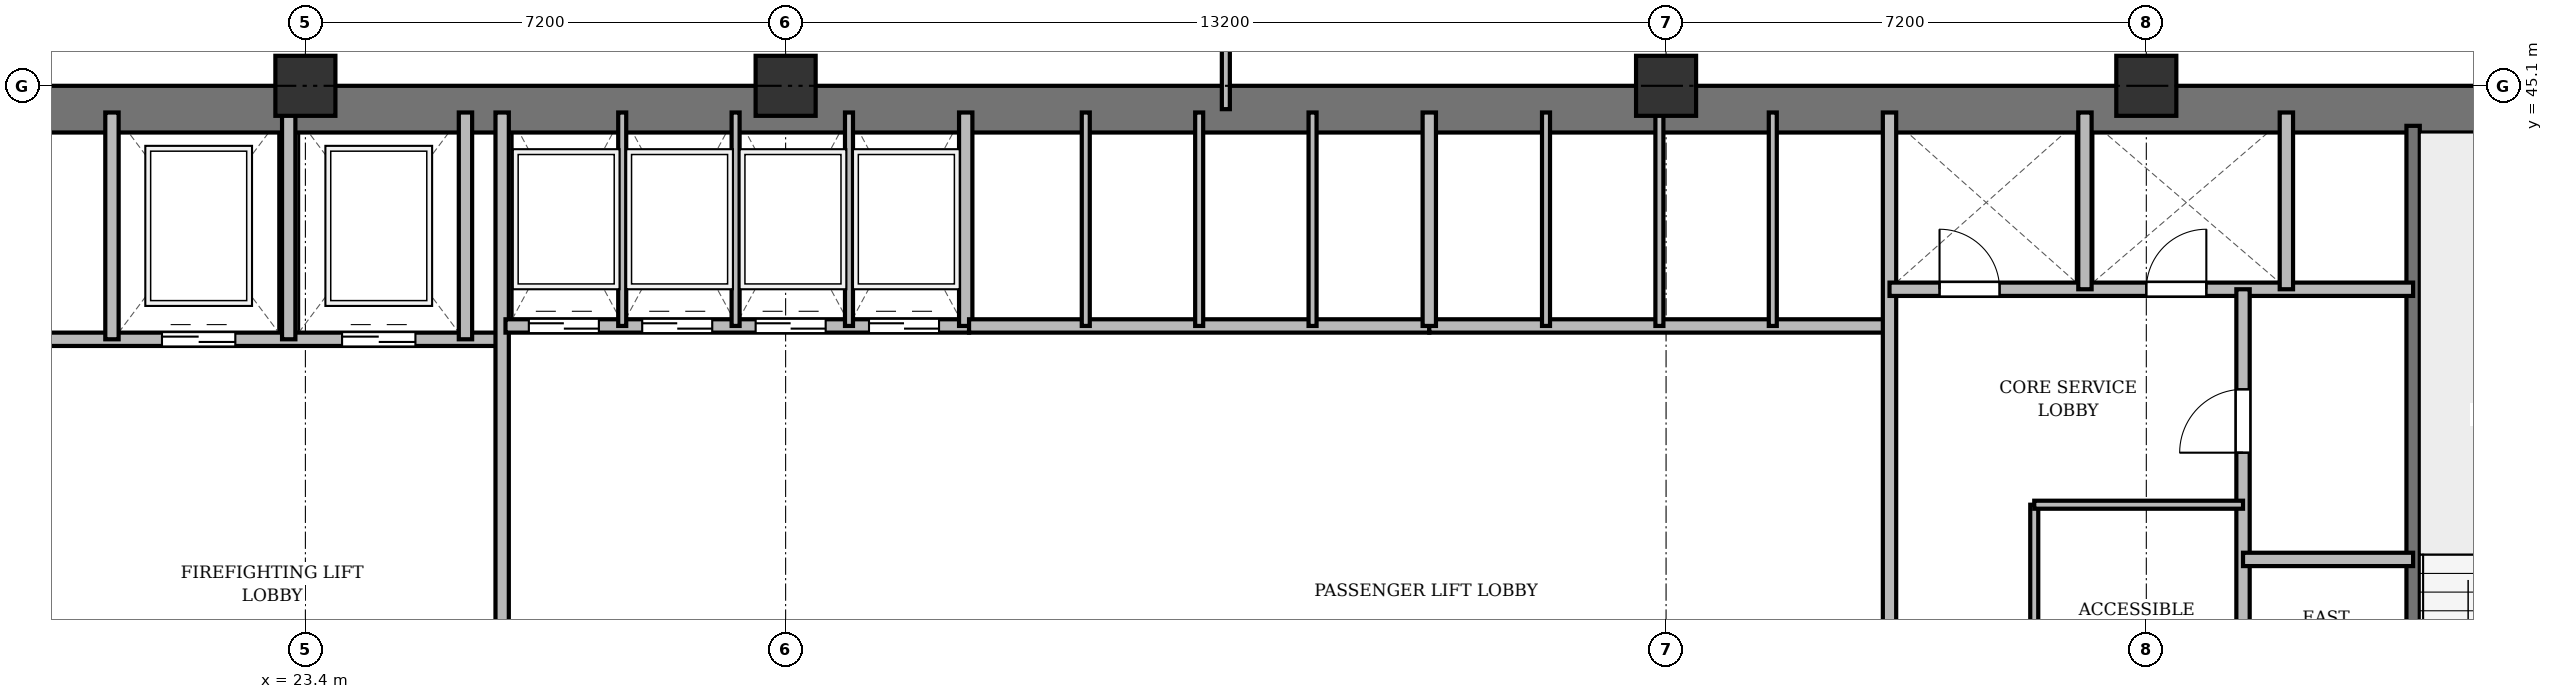
"""IFC4 building model, lengths in metres.
Left out: names, types, materials, properties, quantities, classifications, styles, units other than length and angle.
Written with IfcOpenShell. Run it as: python <this file> out.ifc"""

import sys

from ifc_helpers import new_model, si_unit, direction, frame, frame_2d, origin, origin_2d, place, context, subcontext, project, spatial, rectangle, extrude, source, transform, mapped, element, fill, save


model = new_model("IFC4")
c1 = context("Model", 3, precision=1e-05, world=origin(), true_north=direction((0.0, 1.0)))
c2 = subcontext(c1, "Body", "Model", "MODEL_VIEW")
j1 = project(units=[si_unit("LENGTHUNIT", "METRE"), si_unit("PLANEANGLEUNIT", "RADIAN")], contexts=[c1])
p1 = place(None, origin())
s1 = spatial("IfcSite", under=j1, at=p1, CompositionType="ELEMENT")
p2 = place(p1, origin())
s2 = spatial("IfcBuilding", under=s1, at=p2, CompositionType="ELEMENT")
p3 = place(p2, frame((0.0, 0.0, 27.1)))
s3 = spatial("IfcBuildingStorey", under=s2, at=p3, CompositionType="ELEMENT", Elevation=27.1)
m1 = source(origin(), c2, "Body", "SweptSolid", [
    extrude(rectangle(XDim=0.9, YDim=0.9, at=origin_2d()), origin(), (0.0, 0.0, 1.0), 3.6),
])
for number, where, z_axis, x_axis in (
    (1, (23.4, 45.1, 0.0), (0.0, 0.0, 1.0), (1.0, 0.0, 0.0)),
    (2, (30.6, 45.1, 0.0), (0.0, 0.0, 1.0), (1.0, 0.0, 0.0)),
    (3, (43.8, 45.1, 0.0), (0.0, 0.0, 1.0), (1.0, 0.0, 0.0)),
    (4, (51.0, 45.1, 0.0), (0.0, 0.0, 1.0), (1.0, 0.0, 0.0)),
):
    element("IfcColumn", number, at=place(p3, frame(where, z_axis=z_axis, x_axis=x_axis)), inside=s3, PredefinedType="COLUMN", context=c2, shape_type="MappedRepresentation", body=[
        mapped(m1, transform((0.0, 0.0, 0.0), x_axis=(1.0, 0.0, 0.0), y_axis=(0.0, 1.0, 0.0), z_axis=(0.0, 0.0, 1.0), scale=1.0)),
    ])
p4 = place(p3, frame((15.5, 44.75, 0.0), z_axis=(0.0, 0.0, 1.0), x_axis=(1.0, 0.0, 0.0)))
e5 = element("IfcWall", 5, at=p4, inside=s3, PredefinedType="SHEAR", context=c2, shape_type="SweptSolid", body=[
    extrude(rectangle(XDim=43.4, YDim=0.7, at=frame_2d((21.7, 0.0))), origin(), (0.0, 0.0, 1.0), 3.34),
])
p5 = place(p3, frame((55.0, 33.4, 0.0), z_axis=(0.0, 0.0, 1.0), x_axis=(0.0, 1.0, 0.0)))
e6 = element("IfcWall", 6, at=p5, inside=s3, PredefinedType="SHEAR", context=c2, shape_type="SweptSolid", body=[
    extrude(rectangle(XDim=11.1, YDim=0.2, at=frame_2d((5.55, 0.0))), origin(), (0.0, 0.0, 1.0), 3.34),
])
p6 = place(p5, frame((0.85, 0.0, 0.0)))
e7 = element("IfcOpeningElement", 7, at=p6, cuts=e6, PredefinedType="OPENING", context=c2, shape_type="SweptSolid", body=[
    extrude(rectangle(XDim=1.1, YDim=2.15, at=frame_2d((0.55, 1.075))), frame((0.0, 0.11, 0.0), z_axis=(0.0, -1.0, 0.0), x_axis=(1.0, 0.0, 0.0)), (0.0, 0.0, 1.0), 0.22),
])
p7 = place(p3, frame((19.55, 41.3, 0.0), z_axis=(0.0, 0.0, 1.0), x_axis=(1.0, 0.0, 0.0)))
e8 = element("IfcWall", 8, at=p7, inside=s3, PredefinedType="SOLIDWALL", context=c2, shape_type="SweptSolid", body=[
    extrude(rectangle(XDim=6.75, YDim=0.2, at=frame_2d((3.375, 0.0))), origin(), (0.0, 0.0, 1.0), 3.34),
])
p8 = place(p7, frame((1.7, 0.0, 0.0)))
e9 = element("IfcOpeningElement", 9, at=p8, cuts=e8, PredefinedType="OPENING", context=c2, shape_type="SweptSolid", body=[
    extrude(rectangle(XDim=1.1, YDim=2.15, at=frame_2d((0.55, 1.075))), frame((0.0, 0.11, 0.0), z_axis=(0.0, -1.0, 0.0), x_axis=(1.0, 0.0, 0.0)), (0.0, 0.0, 1.0), 0.22),
])
p9 = place(p7, frame((4.4, 0.0, 0.0)))
e10 = element("IfcOpeningElement", 10, at=p9, cuts=e8, PredefinedType="OPENING", context=c2, shape_type="SweptSolid", body=[
    extrude(rectangle(XDim=1.1, YDim=2.15, at=frame_2d((0.55, 1.075))), frame((0.0, 0.11, 0.0), z_axis=(0.0, -1.0, 0.0), x_axis=(1.0, 0.0, 0.0)), (0.0, 0.0, 1.0), 0.22),
])
for number, where, z_axis, x_axis in (
    (11, (20.5, 41.3, 0.0), (0.0, 0.0, 1.0), (0.0, 1.0, 0.0)),
    (12, (23.15, 41.3, 0.0), (0.0, 0.0, 1.0), (0.0, 1.0, 0.0)),
    (13, (25.8, 41.3, 0.0), (0.0, 0.0, 1.0), (0.0, 1.0, 0.0)),
):
    element("IfcWall", number, at=place(p3, frame(where, z_axis=z_axis, x_axis=x_axis)), inside=s3, PredefinedType="SOLIDWALL", context=c2, shape_type="SweptSolid", body=[
        extrude(rectangle(XDim=3.4, YDim=0.2, at=frame_2d((1.7, 0.0))), origin(), (0.0, 0.0, 1.0), 3.34),
    ])
p10 = place(p3, frame((26.35, 33.4, 0.0), z_axis=(0.0, 0.0, 1.0), x_axis=(0.0, 1.0, 0.0)))
e14 = element("IfcWall", 14, at=p10, inside=s3, PredefinedType="SOLIDWALL", context=c2, shape_type="SweptSolid", body=[
    extrude(rectangle(XDim=11.3, YDim=0.2, at=frame_2d((5.65, 0.0))), origin(), (0.0, 0.0, 1.0), 2.69),
])
p11 = place(p3, frame((26.4, 41.5, 0.0), z_axis=(0.0, 0.0, 1.0), x_axis=(1.0, 0.0, 0.0)))
e15 = element("IfcWall", 15, at=p11, inside=s3, PredefinedType="SOLIDWALL", context=c2, shape_type="SweptSolid", body=[
    extrude(rectangle(XDim=6.95, YDim=0.2, at=frame_2d((3.475, 0.0))), origin(), (0.0, 0.0, 1.0), 3.34),
])
p12 = place(p11, frame((0.35, 0.0, 0.0)))
e16 = element("IfcOpeningElement", 16, at=p12, cuts=e15, PredefinedType="OPENING", context=c2, shape_type="SweptSolid", body=[
    extrude(rectangle(XDim=1.05, YDim=2.15, at=frame_2d((0.525, 1.075))), frame((0.0, 0.11, 0.0), z_axis=(0.0, -1.0, 0.0), x_axis=(1.0, 0.0, 0.0)), (0.0, 0.0, 1.0), 0.22),
])
p13 = place(p11, frame((2.05, 0.0, 0.0)))
e17 = element("IfcOpeningElement", 17, at=p13, cuts=e15, PredefinedType="OPENING", context=c2, shape_type="SweptSolid", body=[
    extrude(rectangle(XDim=1.05, YDim=2.15, at=frame_2d((0.525, 1.075))), frame((0.0, 0.11, 0.0), z_axis=(0.0, -1.0, 0.0), x_axis=(1.0, 0.0, 0.0)), (0.0, 0.0, 1.0), 0.22),
])
p14 = place(p11, frame((3.75, 0.0, 0.0)))
e18 = element("IfcOpeningElement", 18, at=p14, cuts=e15, PredefinedType="OPENING", context=c2, shape_type="SweptSolid", body=[
    extrude(rectangle(XDim=1.05, YDim=2.15, at=frame_2d((0.525, 1.075))), frame((0.0, 0.11, 0.0), z_axis=(0.0, -1.0, 0.0), x_axis=(1.0, 0.0, 0.0)), (0.0, 0.0, 1.0), 0.22),
])
p15 = place(p11, frame((5.45, 0.0, 0.0)))
e19 = element("IfcOpeningElement", 19, at=p15, cuts=e15, PredefinedType="OPENING", context=c2, shape_type="SweptSolid", body=[
    extrude(rectangle(XDim=1.05, YDim=2.15, at=frame_2d((0.525, 1.075))), frame((0.0, 0.11, 0.0), z_axis=(0.0, -1.0, 0.0), x_axis=(1.0, 0.0, 0.0)), (0.0, 0.0, 1.0), 0.22),
])
p16 = place(p3, frame((33.3, 41.5, 0.0), z_axis=(0.0, 0.0, 1.0), x_axis=(0.0, 1.0, 0.0)))
e20 = element("IfcWall", 20, at=p16, inside=s3, PredefinedType="SOLIDWALL", context=c2, shape_type="SweptSolid", body=[
    extrude(rectangle(XDim=3.2, YDim=0.2, at=frame_2d((1.6, 0.0))), origin(), (0.0, 0.0, 1.0), 3.34),
])
for number, where, z_axis, x_axis in (
    (21, (28.15, 41.5, 0.0), (0.0, 0.0, 1.0), (0.0, 1.0, 0.0)),
    (22, (29.85, 41.5, 0.0), (0.0, 0.0, 1.0), (0.0, 1.0, 0.0)),
    (23, (31.55, 41.5, 0.0), (0.0, 0.0, 1.0), (0.0, 1.0, 0.0)),
):
    element("IfcWall", number, at=place(p3, frame(where, z_axis=z_axis, x_axis=x_axis)), inside=s3, PredefinedType="PARTITIONING", context=c2, shape_type="SweptSolid", body=[
        extrude(rectangle(XDim=3.2, YDim=0.12, at=frame_2d((1.6, 0.0))), origin(), (0.0, 0.0, 1.0), 3.34),
    ])
p17 = place(p3, frame((33.35, 41.5, 0.0), z_axis=(0.0, 0.0, 1.0), x_axis=(1.0, 0.0, 0.0)))
e24 = element("IfcWall", 24, at=p17, inside=s3, PredefinedType="SOLIDWALL", context=c2, shape_type="SweptSolid", body=[
    extrude(rectangle(XDim=6.9, YDim=0.2, at=frame_2d((3.45, 0.0))), origin(), (0.0, 0.0, 1.0), 3.34),
])
for number, where, z_axis, x_axis in (
    (25, (35.1, 41.5, 0.0), (0.0, 0.0, 1.0), (0.0, 1.0, 0.0)),
    (26, (36.8, 41.5, 0.0), (0.0, 0.0, 1.0), (0.0, 1.0, 0.0)),
    (27, (38.5, 41.5, 0.0), (0.0, 0.0, 1.0), (0.0, 1.0, 0.0)),
):
    element("IfcWall", number, at=place(p3, frame(where, z_axis=z_axis, x_axis=x_axis)), inside=s3, PredefinedType="PARTITIONING", context=c2, shape_type="SweptSolid", body=[
        extrude(rectangle(XDim=3.2, YDim=0.12, at=frame_2d((1.6, 0.0))), origin(), (0.0, 0.0, 1.0), 3.34),
    ])
p18 = place(p3, frame((40.25, 41.5, 0.0), z_axis=(0.0, 0.0, 1.0), x_axis=(1.0, 0.0, 0.0)))
e28 = element("IfcWall", 28, at=p18, inside=s3, PredefinedType="SOLIDWALL", context=c2, shape_type="SweptSolid", body=[
    extrude(rectangle(XDim=6.9, YDim=0.2, at=frame_2d((3.45, 0.0))), origin(), (0.0, 0.0, 1.0), 2.752),
])
p19 = place(p3, frame((40.25, 41.5, 0.0), z_axis=(0.0, 0.0, 1.0), x_axis=(0.0, 1.0, 0.0)))
e29 = element("IfcWall", 29, at=p19, inside=s3, PredefinedType="SOLIDWALL", context=c2, shape_type="SweptSolid", body=[
    extrude(rectangle(XDim=3.2, YDim=0.2, at=frame_2d((1.6, 0.0))), origin(), (0.0, 0.0, 1.0), 3.34),
])
p20 = place(p3, frame((42.0, 41.5, 0.0), z_axis=(0.0, 0.0, 1.0), x_axis=(0.0, 1.0, 0.0)))
e30 = element("IfcWall", 30, at=p20, inside=s3, PredefinedType="PARTITIONING", context=c2, shape_type="SweptSolid", body=[
    extrude(rectangle(XDim=3.2, YDim=0.12, at=frame_2d((1.6, 0.0))), origin(), (0.0, 0.0, 1.0), 3.34),
])
p21 = place(p3, frame((43.7, 41.5, 0.0), z_axis=(0.0, 0.0, 1.0), x_axis=(0.0, 1.0, 0.0)))
e31 = element("IfcWall", 31, at=p21, inside=s3, PredefinedType="PARTITIONING", context=c2, shape_type="SweptSolid", body=[
    extrude(rectangle(XDim=3.2, YDim=0.12, at=frame_2d((1.6, 0.0))), origin(), (0.0, 0.0, 1.0), 2.752),
])
p22 = place(p3, frame((45.4, 41.5, 0.0), z_axis=(0.0, 0.0, 1.0), x_axis=(0.0, 1.0, 0.0)))
e32 = element("IfcWall", 32, at=p22, inside=s3, PredefinedType="PARTITIONING", context=c2, shape_type="SweptSolid", body=[
    extrude(rectangle(XDim=3.2, YDim=0.12, at=frame_2d((1.6, 0.0))), origin(), (0.0, 0.0, 1.0), 3.34),
])
p23 = place(p3, frame((47.15, 33.4, 0.0), z_axis=(0.0, 0.0, 1.0), x_axis=(0.0, 1.0, 0.0)))
e33 = element("IfcWall", 33, at=p23, inside=s3, PredefinedType="SOLIDWALL", context=c2, shape_type="SweptSolid", body=[
    extrude(rectangle(XDim=11.3, YDim=0.2, at=frame_2d((5.65, 0.0))), origin(), (0.0, 0.0, 1.0), 2.69),
])
p24 = place(p3, frame((47.15, 42.05, 0.0), z_axis=(0.0, 0.0, 1.0), x_axis=(1.0, 0.0, 0.0)))
e34 = element("IfcWall", 34, at=p24, inside=s3, PredefinedType="SOLIDWALL", context=c2, shape_type="SweptSolid", body=[
    extrude(rectangle(XDim=7.85, YDim=0.2, at=frame_2d((3.925, 0.0))), origin(), (0.0, 0.0, 1.0), 2.752),
])
p25 = place(p24, frame((0.75, 0.0, 0.0)))
e35 = element("IfcOpeningElement", 35, at=p25, cuts=e34, PredefinedType="OPENING", context=c2, shape_type="SweptSolid", body=[
    extrude(rectangle(XDim=0.9, YDim=2.1, at=frame_2d((0.45, 1.05))), frame((0.0, 0.11, 0.0), z_axis=(0.0, -1.0, 0.0), x_axis=(1.0, 0.0, 0.0)), (0.0, 0.0, 1.0), 0.22),
])
p26 = place(p24, frame((3.85, 0.0, 0.0)))
e36 = element("IfcOpeningElement", 36, at=p26, cuts=e34, PredefinedType="OPENING", context=c2, shape_type="SweptSolid", body=[
    extrude(rectangle(XDim=0.9, YDim=2.1, at=frame_2d((0.45, 1.05))), frame((0.0, 0.11, 0.0), z_axis=(0.0, -1.0, 0.0), x_axis=(1.0, 0.0, 0.0)), (0.0, 0.0, 1.0), 0.22),
])
for number, where, z_axis, x_axis in (
    (37, (50.08, 42.05, 0.0), (0.0, 0.0, 1.0), (0.0, 1.0, 0.0)),
    (38, (53.1, 42.05, 0.0), (0.0, 0.0, 1.0), (0.0, 1.0, 0.0)),
):
    element("IfcWall", number, at=place(p3, frame(where, z_axis=z_axis, x_axis=x_axis)), inside=s3, PredefinedType="SOLIDWALL", context=c2, shape_type="SweptSolid", body=[
        extrude(rectangle(XDim=2.65, YDim=0.2, at=frame_2d((1.325, 0.0))), origin(), (0.0, 0.0, 1.0), 3.34),
    ])
p27 = place(p3, frame((52.45, 33.4, 0.0), z_axis=(0.0, 0.0, 1.0), x_axis=(0.0, 1.0, 0.0)))
e39 = element("IfcWall", 39, at=p27, inside=s3, PredefinedType="PARTITIONING", context=c2, shape_type="SweptSolid", body=[
    extrude(rectangle(XDim=8.65, YDim=0.2, at=frame_2d((4.325, 0.0))), origin(), (0.0, 0.0, 1.0), 2.69),
])
p28 = place(p27, frame((6.2, 0.0, 0.0)))
e40 = element("IfcOpeningElement", 40, at=p28, cuts=e39, PredefinedType="OPENING", context=c2, shape_type="SweptSolid", body=[
    extrude(rectangle(XDim=0.95, YDim=2.15, at=frame_2d((0.475, 1.075))), frame((0.0, 0.11, 0.0), z_axis=(0.0, -1.0, 0.0), x_axis=(1.0, 0.0, 0.0)), (0.0, 0.0, 1.0), 0.22),
])
p29 = place(p3, frame((52.45, 38.0, 0.0), z_axis=(0.0, 0.0, 1.0), x_axis=(1.0, 0.0, 0.0)))
e41 = element("IfcWall", 41, at=p29, inside=s3, PredefinedType="PARTITIONING", context=c2, shape_type="SweptSolid", body=[
    extrude(rectangle(XDim=2.55, YDim=0.2, at=frame_2d((1.275, 0.0))), origin(), (0.0, 0.0, 1.0), 3.34),
])
p30 = place(p3, frame((49.32, 33.4, 0.0), z_axis=(0.0, 0.0, 1.0), x_axis=(0.0, 1.0, 0.0)))
e42 = element("IfcWall", 42, at=p30, inside=s3, PredefinedType="PARTITIONING", context=c2, shape_type="SweptSolid", body=[
    extrude(rectangle(XDim=5.42, YDim=0.12, at=frame_2d((2.71, 0.0))), origin(), (0.0, 0.0, 1.0), 2.69),
])
p31 = place(p30, frame((1.6, 0.0, 0.0)))
e43 = element("IfcOpeningElement", 43, at=p31, cuts=e42, PredefinedType="OPENING", context=c2, shape_type="SweptSolid", body=[
    extrude(rectangle(XDim=0.95, YDim=2.15, at=frame_2d((0.475, 1.075))), frame((0.0, 0.07, 0.0), z_axis=(0.0, -1.0, 0.0), x_axis=(1.0, 0.0, 0.0)), (0.0, 0.0, 1.0), 0.14),
])
p32 = place(p3, frame((49.32, 38.82, 0.0), z_axis=(0.0, 0.0, 1.0), x_axis=(1.0, 0.0, 0.0)))
e44 = element("IfcWall", 44, at=p32, inside=s3, PredefinedType="PARTITIONING", context=c2, shape_type="SweptSolid", body=[
    extrude(rectangle(XDim=3.13, YDim=0.12, at=frame_2d((1.565, 0.0))), origin(), (0.0, 0.0, 1.0), 2.752),
])
p33 = place(p3, frame((37.2, 44.75, 0.0), z_axis=(0.0, 0.0, 1.0), x_axis=(0.0, 1.0, 0.0)))
e45 = element("IfcWall", 45, at=p33, inside=s3, PredefinedType="PARTITIONING", context=c2, shape_type="SweptSolid", body=[
    extrude(rectangle(XDim=3.61, YDim=0.12, at=frame_2d((1.805, 0.0))), origin(), (0.0, 0.0, 1.0), 2.69),
])
p34 = place(p33, frame((1.1, 0.0, 0.0)))
e46 = element("IfcOpeningElement", 46, at=p34, cuts=e45, PredefinedType="OPENING", context=c2, shape_type="SweptSolid", body=[
    extrude(rectangle(XDim=0.95, YDim=2.15, at=frame_2d((0.475, 1.075))), frame((0.0, 0.07, 0.0), z_axis=(0.0, -1.0, 0.0), x_axis=(1.0, 0.0, 0.0)), (0.0, 0.0, 1.0), 0.14),
])
m2 = source(origin(), c2, "Body", "SweptSolid", [
    extrude(rectangle(XDim=1.1, YDim=2.15, at=frame_2d((0.55, 1.075))), frame((0.0, 0.025, 0.0), z_axis=(0.0, -1.0, 0.0), x_axis=(1.0, 0.0, 0.0)), (0.0, 0.0, 1.0), 0.05),
])
p35 = place(p8, origin())
e47 = element("IfcDoor", 47, at=p35, inside=s3, OperationType="DOUBLE_DOOR_SLIDING", PredefinedType="DOOR", context=c2, shape_type="MappedRepresentation", body=[
    mapped(m2, transform((0.0, 0.0, 0.0), x_axis=(1.0, 0.0, 0.0), y_axis=(0.0, 1.0, 0.0), z_axis=(0.0, 0.0, 1.0), scale=1.0)),
])
fill(e9, e47)
p36 = place(p9, origin())
e48 = element("IfcDoor", 48, at=p36, inside=s3, OperationType="DOUBLE_DOOR_SLIDING", PredefinedType="DOOR", context=c2, shape_type="MappedRepresentation", body=[
    mapped(m2, transform((0.0, 0.0, 0.0), x_axis=(1.0, 0.0, 0.0), y_axis=(0.0, 1.0, 0.0), z_axis=(0.0, 0.0, 1.0), scale=1.0)),
])
fill(e10, e48)
m3 = source(origin(), c2, "Body", "SweptSolid", [
    extrude(rectangle(XDim=1.05, YDim=2.15, at=frame_2d((0.525, 1.075))), frame((0.0, 0.025, 0.0), z_axis=(0.0, -1.0, 0.0), x_axis=(1.0, 0.0, 0.0)), (0.0, 0.0, 1.0), 0.05),
])
p37 = place(p12, origin())
e49 = element("IfcDoor", 49, at=p37, inside=s3, OperationType="DOUBLE_DOOR_SLIDING", PredefinedType="DOOR", context=c2, shape_type="MappedRepresentation", body=[
    mapped(m3, transform((0.0, 0.0, 0.0), x_axis=(1.0, 0.0, 0.0), y_axis=(0.0, 1.0, 0.0), z_axis=(0.0, 0.0, 1.0), scale=1.0)),
])
fill(e16, e49)
p38 = place(p13, origin())
e50 = element("IfcDoor", 50, at=p38, inside=s3, OperationType="DOUBLE_DOOR_SLIDING", PredefinedType="DOOR", context=c2, shape_type="MappedRepresentation", body=[
    mapped(m3, transform((0.0, 0.0, 0.0), x_axis=(1.0, 0.0, 0.0), y_axis=(0.0, 1.0, 0.0), z_axis=(0.0, 0.0, 1.0), scale=1.0)),
])
fill(e17, e50)
p39 = place(p14, origin())
e51 = element("IfcDoor", 51, at=p39, inside=s3, OperationType="DOUBLE_DOOR_SLIDING", PredefinedType="DOOR", context=c2, shape_type="MappedRepresentation", body=[
    mapped(m3, transform((0.0, 0.0, 0.0), x_axis=(1.0, 0.0, 0.0), y_axis=(0.0, 1.0, 0.0), z_axis=(0.0, 0.0, 1.0), scale=1.0)),
])
fill(e18, e51)
p40 = place(p15, origin())
e52 = element("IfcDoor", 52, at=p40, inside=s3, OperationType="DOUBLE_DOOR_SLIDING", PredefinedType="DOOR", context=c2, shape_type="MappedRepresentation", body=[
    mapped(m3, transform((0.0, 0.0, 0.0), x_axis=(1.0, 0.0, 0.0), y_axis=(0.0, 1.0, 0.0), z_axis=(0.0, 0.0, 1.0), scale=1.0)),
])
fill(e19, e52)
m4 = source(origin(), c2, "Body", "SweptSolid", [
    extrude(rectangle(XDim=0.9, YDim=2.1, at=frame_2d((0.45, 1.05))), frame((0.0, 0.025, 0.0), z_axis=(0.0, -1.0, 0.0), x_axis=(1.0, 0.0, 0.0)), (0.0, 0.0, 1.0), 0.05),
])
p41 = place(p25, origin())
e53 = element("IfcDoor", 53, at=p41, inside=s3, OperationType="SINGLE_SWING_LEFT", PredefinedType="DOOR", context=c2, shape_type="MappedRepresentation", body=[
    mapped(m4, transform((0.0, 0.0, 0.0), x_axis=(1.0, 0.0, 0.0), y_axis=(0.0, 1.0, 0.0), z_axis=(0.0, 0.0, 1.0), scale=1.0)),
])
fill(e35, e53)
p42 = place(p26, origin())
e54 = element("IfcDoor", 54, at=p42, inside=s3, OperationType="SINGLE_SWING_RIGHT", PredefinedType="DOOR", context=c2, shape_type="MappedRepresentation", body=[
    mapped(m4, transform((0.0, 0.0, 0.0), x_axis=(1.0, 0.0, 0.0), y_axis=(0.0, 1.0, 0.0), z_axis=(0.0, 0.0, 1.0), scale=1.0)),
])
fill(e36, e54)
m5 = source(origin(), c2, "Body", "SweptSolid", [
    extrude(rectangle(XDim=0.95, YDim=2.15, at=frame_2d((0.475, 1.075))), frame((0.0, 0.025, 0.0), z_axis=(0.0, -1.0, 0.0), x_axis=(1.0, 0.0, 0.0)), (0.0, 0.0, 1.0), 0.05),
])
p43 = place(p28, origin())
e55 = element("IfcDoor", 55, at=p43, inside=s3, OperationType="SINGLE_SWING_LEFT", PredefinedType="DOOR", context=c2, shape_type="MappedRepresentation", body=[
    mapped(m5, transform((0.0, 0.0, 0.0), x_axis=(1.0, 0.0, 0.0), y_axis=(0.0, 1.0, 0.0), z_axis=(0.0, 0.0, 1.0), scale=1.0)),
])
fill(e40, e55)
save(model, sys.argv[1])
